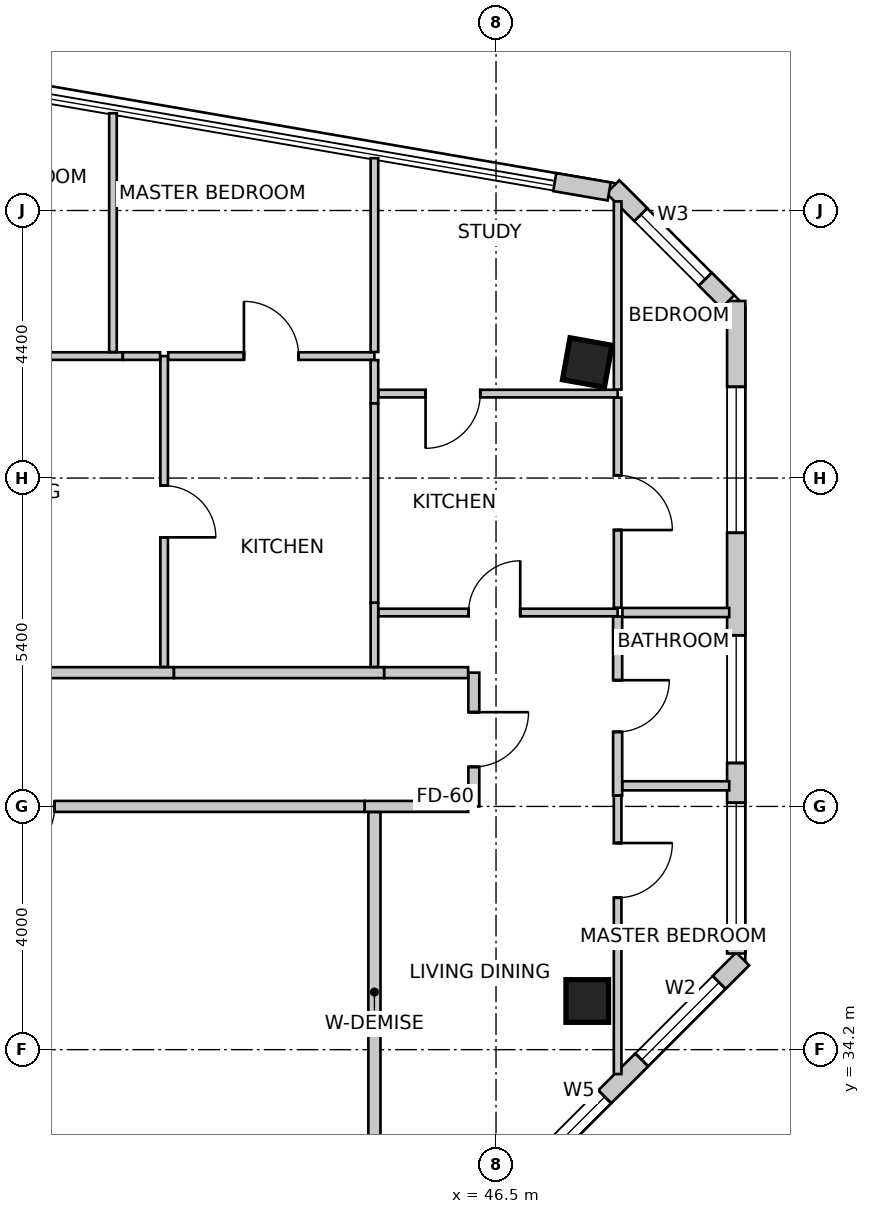
"""IFC4 building model, lengths in metres.
Left out: names, types, materials, properties, quantities, classifications, styles, units other than length and angle.
Written with IfcOpenShell. Run it as: python <this file> out.ifc"""

import sys

from ifc_helpers import new_model, si_unit, direction, frame, frame_2d, origin, origin_2d, place, context, subcontext, project, spatial, rectangle, extrude, source, transform, mapped, element, fill, save


model = new_model("IFC4")
c1 = context("Model", 3, precision=1e-05, world=origin(), true_north=direction((0.0, 1.0)))
c2 = subcontext(c1, "Body", "Model", "MODEL_VIEW")
j1 = project(units=[si_unit("LENGTHUNIT", "METRE"), si_unit("PLANEANGLEUNIT", "RADIAN")], contexts=[c1])
p1 = place(None, origin())
s1 = spatial("IfcSite", under=j1, at=p1, CompositionType="ELEMENT")
p2 = place(p1, origin())
s2 = spatial("IfcBuilding", under=s1, at=p2, CompositionType="ELEMENT")
p3 = place(p2, frame((0.0, 0.0, 200.9)))
s3 = spatial("IfcBuildingStorey", under=s2, at=p3, CompositionType="ELEMENT", Elevation=200.9)
m1 = source(origin(), c2, "Body", "SweptSolid", [
    extrude(rectangle(XDim=0.7, YDim=0.7, at=origin_2d()), origin(), (0.0, 0.0, 1.0), 3.5),
])
for number, where, z_axis, x_axis in (
    (1, (48.0, 45.5, 0.0), (0.0, 0.0, 1.0), (0.984, -0.177, 0.0)),
    (2, (48.0, 35.0, 0.0), (0.0, 0.0, 1.0), (1.0, 0.0, 0.0)),
):
    element("IfcColumn", number, at=place(p3, frame(where, z_axis=z_axis, x_axis=x_axis)), inside=s3, PredefinedType="COLUMN", context=c2, shape_type="MappedRepresentation", body=[
        mapped(m1, transform((0.0, 0.0, 0.0), scale=1.0)),
    ])
p4 = place(p3, frame((47.076, 32.212, 0.0), z_axis=(0.0, 0.0, 1.0), x_axis=(0.707106781187, 0.707106781187, 0.0)))
e3 = element("IfcWall", 3, at=p4, inside=s3, PredefinedType="SOLIDWALL", context=c2, shape_type="SweptSolid", body=[
    extrude(rectangle(XDim=4.922, YDim=0.3, at=frame_2d((2.461, 0.0))), origin(), (0.0, 0.0, 1.0), 3.25),
])
m2 = source(origin(), c2, "Body", "SweptSolid", [
    extrude(rectangle(XDim=1.2, YDim=1.6, at=frame_2d((0.6, 0.8))), frame((0.0, 0.16, 0.0), z_axis=(0.0, -1.0, 0.0), x_axis=(1.0, 0.0, 0.0)), (0.0, 0.0, 1.0), 0.32),
])
p5 = place(p4, frame((0.515, 0.0, 0.85)))
e4 = element("IfcOpeningElement", 4, at=p5, cuts=e3, PredefinedType="OPENING", context=c2, shape_type="MappedRepresentation", body=[
    mapped(m2, transform((0.0, 0.0, 0.0), scale=1.0)),
])
m3 = source(origin(), c2, "Body", "SweptSolid", [
    extrude(rectangle(XDim=1.8, YDim=2.1, at=frame_2d((0.9, 1.05))), frame((0.0, 0.16, 0.0), z_axis=(0.0, -1.0, 0.0), x_axis=(1.0, 0.0, 0.0)), (0.0, 0.0, 1.0), 0.32),
])
p6 = place(p4, frame((2.575, 0.0, 0.85)))
e5 = element("IfcOpeningElement", 5, at=p6, cuts=e3, PredefinedType="OPENING", context=c2, shape_type="MappedRepresentation", body=[
    mapped(m3, transform((0.0, 0.0, 0.0), scale=1.0)),
])
p7 = place(p3, frame((50.45, 35.781, 0.0), z_axis=(0.0, 0.0, 1.0), x_axis=(0.0, 1.0, 0.0)))
e6 = element("IfcWall", 6, at=p7, inside=s3, PredefinedType="SOLIDWALL", context=c2, shape_type="SweptSolid", body=[
    extrude(rectangle(XDim=10.731, YDim=0.3, at=frame_2d((5.365, 0.0))), origin(), (0.0, 0.0, 1.0), 3.25),
])
m4 = source(origin(), c2, "Body", "SweptSolid", [
    extrude(rectangle(XDim=2.1, YDim=2.0, at=frame_2d((1.05, 1.0))), frame((0.0, 0.16, 0.0), z_axis=(0.0, -1.0, 0.0), x_axis=(1.0, 0.0, 0.0)), (0.0, 0.0, 1.0), 0.32),
])
p8 = place(p7, frame((0.379, 0.0, 0.85)))
e7 = element("IfcOpeningElement", 7, at=p8, cuts=e6, PredefinedType="OPENING", context=c2, shape_type="MappedRepresentation", body=[
    mapped(m4, transform((0.0, 0.0, 0.0), scale=1.0)),
])
p9 = place(p7, frame((3.133, 0.0, 0.85)))
e8 = element("IfcOpeningElement", 8, at=p9, cuts=e6, PredefinedType="OPENING", context=c2, shape_type="MappedRepresentation", body=[
    mapped(m4, transform((0.0, 0.0, 0.0), scale=1.0)),
])
m5 = source(origin(), c2, "Body", "SweptSolid", [
    extrude(rectangle(XDim=2.4, YDim=2.2, at=frame_2d((1.2, 1.1))), frame((0.0, 0.16, 0.0), z_axis=(0.0, -1.0, 0.0), x_axis=(1.0, 0.0, 0.0)), (0.0, 0.0, 1.0), 0.32),
])
p10 = place(p7, frame((6.919, 0.0, 0.85)))
e9 = element("IfcOpeningElement", 9, at=p10, cuts=e6, PredefinedType="OPENING", context=c2, shape_type="MappedRepresentation", body=[
    mapped(m5, transform((0.0, 0.0, 0.0), scale=1.0)),
])
p11 = place(p3, frame((50.312, 46.5, 0.0), z_axis=(0.0, 0.0, 1.0), x_axis=(-0.707106781187, 0.707106781187, 0.0)))
e10 = element("IfcWall", 10, at=p11, inside=s3, PredefinedType="SOLIDWALL", context=c2, shape_type="SweptSolid", body=[
    extrude(rectangle(XDim=2.673, YDim=0.3, at=frame_2d((1.337, 0.0))), origin(), (0.0, 0.0, 1.0), 3.25),
])
m6 = source(origin(), c2, "Body", "SweptSolid", [
    extrude(rectangle(XDim=1.5, YDim=1.8, at=frame_2d((0.75, 0.9))), frame((0.0, 0.16, 0.0), z_axis=(0.0, -1.0, 0.0), x_axis=(1.0, 0.0, 0.0)), (0.0, 0.0, 1.0), 0.32),
])
p12 = place(p11, frame((0.524, 0.0, 0.85)))
e11 = element("IfcOpeningElement", 11, at=p12, cuts=e10, PredefinedType="OPENING", context=c2, shape_type="MappedRepresentation", body=[
    mapped(m6, transform((0.0, 0.0, 0.0), scale=1.0)),
])
p13 = place(p3, frame((48.361, 48.313, 0.0), z_axis=(0.0, 0.0, 1.0), x_axis=(-0.985560806516, 0.169321872949, 0.0)))
e12 = element("IfcWall", 12, at=p13, inside=s3, PredefinedType="SOLIDWALL", context=c2, shape_type="SweptSolid", body=[
    extrude(rectangle(XDim=0.908, YDim=0.3, at=frame_2d((0.454, 0.0))), origin(), (0.0, 0.0, 1.0), 3.25),
])
p14 = place(p3, frame((33.244, 40.4, 0.0), z_axis=(0.0, 0.0, 1.0), x_axis=(1.0, 0.0, 0.0)))
e13 = element("IfcWall", 13, at=p14, inside=s3, PredefinedType="PARTITIONING", context=c2, shape_type="SweptSolid", body=[
    extrude(rectangle(XDim=7.958, YDim=0.18, at=frame_2d((3.979, 0.0))), origin(), (0.0, 0.0, 1.0), 2.766),
])
m7 = source(origin(), c2, "Body", "SweptSolid", [
    extrude(rectangle(XDim=0.9, YDim=2.15, at=frame_2d((0.45, 1.075))), frame((0.0, 0.1, 0.0), z_axis=(0.0, -1.0, 0.0), x_axis=(1.0, 0.0, 0.0)), (0.0, 0.0, 1.0), 0.2),
])
p15 = place(p14, frame((2.807, 0.0, 0.0)))
e14 = element("IfcOpeningElement", 14, at=p15, cuts=e13, PredefinedType="OPENING", context=c2, shape_type="MappedRepresentation", body=[
    mapped(m7, transform((0.0, 0.0, 0.0), scale=1.0)),
])
p16 = place(p3, frame((41.204, 40.4, 0.0), z_axis=(0.0, 0.0, 1.0), x_axis=(1.0, 0.0, 0.0)))
e15 = element("IfcWall", 15, at=p16, inside=s3, PredefinedType="PARTITIONING", context=c2, shape_type="SweptSolid", body=[
    extrude(rectangle(XDim=3.456, YDim=0.18, at=frame_2d((1.728, 0.0))), origin(), (0.0, 0.0, 1.0), 2.822),
])
p17 = place(p3, frame((46.135, 40.4, 0.0), z_axis=(0.0, 0.0, 1.0), x_axis=(0.0, -1.0, 0.0)))
e16 = element("IfcWall", 16, at=p17, inside=s3, PredefinedType="PARTITIONING", context=c2, shape_type="SweptSolid", body=[
    extrude(rectangle(XDim=2.2, YDim=0.18, at=frame_2d((1.1, 0.0))), origin(), (0.0, 0.0, 1.0), 3.25),
])
p18 = place(p17, frame((0.65, 0.0, 0.0)))
e17 = element("IfcOpeningElement", 17, at=p18, cuts=e16, PredefinedType="OPENING", context=c2, shape_type="MappedRepresentation", body=[
    mapped(m7, transform((0.0, 0.0, 0.0), scale=1.0)),
])
p19 = place(p3, frame((44.662, 40.4, 0.0), z_axis=(0.0, 0.0, 1.0), x_axis=(1.0, 0.0, 0.0)))
e18 = element("IfcWall", 18, at=p19, inside=s3, PredefinedType="PARTITIONING", context=c2, shape_type="SweptSolid", body=[
    extrude(rectangle(XDim=1.379, YDim=0.18, at=frame_2d((0.689, 0.0))), origin(), (0.0, 0.0, 1.0), 3.25),
])
p20 = place(p3, frame((46.041, 38.2, 0.0), z_axis=(0.0, 0.0, 1.0), x_axis=(-1.0, 0.0, 0.0)))
e19 = element("IfcWall", 19, at=p20, inside=s3, PredefinedType="PARTITIONING", context=c2, shape_type="SweptSolid", body=[
    extrude(rectangle(XDim=1.701, YDim=0.18, at=frame_2d((0.851, 0.0))), origin(), (0.0, 0.0, 1.0), 2.934),
])
p21 = place(p3, frame((44.338, 38.2, 0.0), z_axis=(0.0, 0.0, 1.0), x_axis=(-1.0, 0.0, 0.0)))
e20 = element("IfcWall", 20, at=p21, inside=s3, PredefinedType="PARTITIONING", context=c2, shape_type="SweptSolid", body=[
    extrude(rectangle(XDim=11.094, YDim=0.18, at=frame_2d((5.547, 0.0))), origin(), (0.0, 0.0, 1.0), 2.766),
])
p22 = place(p21, frame((5.097, 0.0, 0.0)))
e21 = element("IfcOpeningElement", 21, at=p22, cuts=e20, PredefinedType="OPENING", context=c2, shape_type="MappedRepresentation", body=[
    mapped(m7, transform((0.0, 0.0, 0.0), scale=1.0)),
])
p23 = place(p3, frame((41.042, 45.606, 0.0), z_axis=(0.0, 0.0, 1.0), x_axis=(0.0, -1.0, 0.0)))
e22 = element("IfcWall", 22, at=p23, inside=s3, PredefinedType="PARTITIONING", context=c2, shape_type="SweptSolid", body=[
    extrude(rectangle(XDim=5.112, YDim=0.125, at=frame_2d((2.556, 0.0))), origin(), (0.0, 0.0, 1.0), 2.822),
])
m8 = source(origin(), c2, "Body", "SweptSolid", [
    extrude(rectangle(XDim=0.85, YDim=2.15, at=frame_2d((0.425, 1.075))), frame((0.0, 0.073, 0.0), z_axis=(0.0, -1.0, 0.0), x_axis=(1.0, 0.0, 0.0)), (0.0, 0.0, 1.0), 0.145),
])
p24 = place(p23, frame((2.131, 0.0, 0.0)))
e23 = element("IfcOpeningElement", 23, at=p24, cuts=e22, PredefinedType="OPENING", context=c2, shape_type="MappedRepresentation", body=[
    mapped(m8, transform((0.0, 0.0, 0.0), scale=1.0)),
])
p25 = place(p3, frame((36.062, 45.606, 0.0), z_axis=(0.0, 0.0, 1.0), x_axis=(1.0, 0.0, 0.0)))
e24 = element("IfcWall", 24, at=p25, inside=s3, PredefinedType="PARTITIONING", context=c2, shape_type="SweptSolid", body=[
    extrude(rectangle(XDim=4.298, YDim=0.125, at=frame_2d((2.149, 0.0))), origin(), (0.0, 0.0, 1.0), 2.766),
])
m9 = source(origin(), c2, "Body", "SweptSolid", [
    extrude(rectangle(XDim=0.9, YDim=2.15, at=frame_2d((0.45, 1.075))), frame((0.0, 0.073, 0.0), z_axis=(0.0, -1.0, 0.0), x_axis=(1.0, 0.0, 0.0)), (0.0, 0.0, 1.0), 0.145),
])
p26 = place(p25, frame((0.403, 0.0, 0.0)))
e25 = element("IfcOpeningElement", 25, at=p26, cuts=e24, PredefinedType="OPENING", context=c2, shape_type="MappedRepresentation", body=[
    mapped(m9, transform((0.0, 0.0, 0.0), scale=1.0)),
])
p27 = place(p3, frame((40.362, 45.606, 0.0), z_axis=(0.0, 0.0, 1.0), x_axis=(1.0, 0.0, 0.0)))
e26 = element("IfcWall", 26, at=p27, inside=s3, PredefinedType="PARTITIONING", context=c2, shape_type="SweptSolid", body=[
    extrude(rectangle(XDim=0.614, YDim=0.125, at=frame_2d((0.307, 0.0))), origin(), (0.0, 0.0, 1.0), 3.25),
])
p28 = place(p3, frame((41.108, 45.606, 0.0), z_axis=(0.0, 0.0, 1.0), x_axis=(1.0, 0.0, 0.0)))
e27 = element("IfcWall", 27, at=p28, inside=s3, PredefinedType="PARTITIONING", context=c2, shape_type="SweptSolid", body=[
    extrude(rectangle(XDim=3.392, YDim=0.125, at=frame_2d((1.696, 0.0))), origin(), (0.0, 0.0, 1.0), 3.25),
])
p29 = place(p28, frame((1.246, 0.0, 0.0)))
e28 = element("IfcOpeningElement", 28, at=p29, cuts=e27, PredefinedType="OPENING", context=c2, shape_type="MappedRepresentation", body=[
    mapped(m9, transform((0.0, 0.0, 0.0), scale=1.0)),
])
p30 = place(p3, frame((44.5, 45.54, 0.0), z_axis=(0.0, 0.0, 1.0), x_axis=(0.0, -1.0, 0.0)))
e29 = element("IfcWall", 29, at=p30, inside=s3, PredefinedType="PARTITIONING", context=c2, shape_type="SweptSolid", body=[
    extrude(rectangle(XDim=0.71, YDim=0.125, at=frame_2d((0.355, 0.0))), origin(), (0.0, 0.0, 1.0), 3.25),
])
p31 = place(p3, frame((44.5, 41.549, 0.0), z_axis=(0.0, 0.0, 1.0), x_axis=(0.0, -1.0, 0.0)))
e30 = element("IfcWall", 30, at=p31, inside=s3, PredefinedType="PARTITIONING", context=c2, shape_type="SweptSolid", body=[
    extrude(rectangle(XDim=1.055, YDim=0.125, at=frame_2d((0.528, 0.0))), origin(), (0.0, 0.0, 1.0), 2.822),
])
p32 = place(p3, frame((44.5, 44.827, 0.0), z_axis=(0.0, 0.0, 1.0), x_axis=(0.0, -1.0, 0.0)))
e31 = element("IfcWall", 31, at=p32, inside=s3, PredefinedType="PARTITIONING", context=c2, shape_type="SweptSolid", body=[
    extrude(rectangle(XDim=3.276, YDim=0.125, at=frame_2d((1.638, 0.0))), origin(), (0.0, 0.0, 1.0), 2.822),
])
p33 = place(p3, frame((40.2, 49.6, 0.0), z_axis=(0.0, 0.0, 1.0), x_axis=(0.0, -1.0, 0.0)))
e32 = element("IfcWall", 32, at=p33, inside=s3, PredefinedType="PARTITIONING", context=c2, shape_type="SweptSolid", body=[
    extrude(rectangle(XDim=3.927, YDim=0.125, at=frame_2d((1.964, 0.0))), origin(), (0.0, 0.0, 1.0), 2.542),
])
p34 = place(p3, frame((44.5, 48.86, 0.0), z_axis=(0.0, 0.0, 1.0), x_axis=(0.0, -1.0, 0.0)))
e33 = element("IfcWall", 33, at=p34, inside=s3, PredefinedType="PARTITIONING", context=c2, shape_type="SweptSolid", body=[
    extrude(rectangle(XDim=3.188, YDim=0.125, at=frame_2d((1.594, 0.0))), origin(), (0.0, 0.0, 1.0), 2.542),
])
p35 = place(p3, frame((48.5, 44.989, 0.0), z_axis=(0.0, 0.0, 1.0), x_axis=(-1.0, 0.0, 0.0)))
e34 = element("IfcWall", 34, at=p35, inside=s3, PredefinedType="PARTITIONING", context=c2, shape_type="SweptSolid", body=[
    extrude(rectangle(XDim=3.934, YDim=0.125, at=frame_2d((1.967, 0.0))), origin(), (0.0, 0.0, 1.0), 2.766),
])
p36 = place(p35, frame((2.259, 0.0, 0.0)))
e35 = element("IfcOpeningElement", 35, at=p36, cuts=e34, PredefinedType="OPENING", context=c2, shape_type="MappedRepresentation", body=[
    mapped(m9, transform((0.0, 0.0, 0.0), scale=1.0)),
])
p37 = place(p3, frame((48.5, 48.149, 0.0), z_axis=(0.0, 0.0, 1.0), x_axis=(0.0, -1.0, 0.0)))
e36 = element("IfcWall", 36, at=p37, inside=s3, PredefinedType="PARTITIONING", context=c2, shape_type="SweptSolid", body=[
    extrude(rectangle(XDim=3.094, YDim=0.125, at=frame_2d((1.547, 0.0))), origin(), (0.0, 0.0, 1.0), 3.25),
])
p38 = place(p3, frame((44.566, 41.389, 0.0), z_axis=(0.0, 0.0, 1.0), x_axis=(1.0, 0.0, 0.0)))
e37 = element("IfcWall", 37, at=p38, inside=s3, PredefinedType="PARTITIONING", context=c2, shape_type="SweptSolid", body=[
    extrude(rectangle(XDim=3.934, YDim=0.125, at=frame_2d((1.967, 0.0))), origin(), (0.0, 0.0, 1.0), 2.766),
])
p39 = place(p38, frame((1.482, 0.0, 0.0)))
e38 = element("IfcOpeningElement", 38, at=p39, cuts=e37, PredefinedType="OPENING", context=c2, shape_type="MappedRepresentation", body=[
    mapped(m8, transform((0.0, 0.0, 0.0), scale=1.0)),
])
p40 = place(p3, frame((48.5, 41.323, 0.0), z_axis=(0.0, 0.0, 1.0), x_axis=(0.0, -1.0, 0.0)))
e39 = element("IfcWall", 39, at=p40, inside=s3, PredefinedType="PARTITIONING", context=c2, shape_type="SweptSolid", body=[
    extrude(rectangle(XDim=2.944, YDim=0.15, at=frame_2d((1.472, 0.0))), origin(), (0.0, 0.0, 1.0), 3.25),
])
m10 = source(origin(), c2, "Body", "SweptSolid", [
    extrude(rectangle(XDim=0.85, YDim=2.15, at=frame_2d((0.425, 1.075))), frame((0.0, 0.085, 0.0), z_axis=(0.0, -1.0, 0.0), x_axis=(1.0, 0.0, 0.0)), (0.0, 0.0, 1.0), 0.17),
])
p41 = place(p40, frame((1.047, 0.0, 0.0)))
e40 = element("IfcOpeningElement", 40, at=p41, cuts=e39, PredefinedType="OPENING", context=c2, shape_type="MappedRepresentation", body=[
    mapped(m10, transform((0.0, 0.0, 0.0), scale=1.0)),
])
p42 = place(p3, frame((48.5, 38.377, 0.0), z_axis=(0.0, 0.0, 1.0), x_axis=(0.0, -1.0, 0.0)))
e41 = element("IfcWall", 41, at=p42, inside=s3, PredefinedType="PARTITIONING", context=c2, shape_type="SweptSolid", body=[
    extrude(rectangle(XDim=4.578, YDim=0.125, at=frame_2d((2.289, 0.0))), origin(), (0.0, 0.0, 1.0), 3.25),
])
p43 = place(p42, frame((0.779, 0.0, 0.0)))
e42 = element("IfcOpeningElement", 42, at=p43, cuts=e41, PredefinedType="OPENING", context=c2, shape_type="MappedRepresentation", body=[
    mapped(m9, transform((0.0, 0.0, 0.0), scale=1.0)),
])
p44 = place(p3, frame((44.5, 32.189, 0.0), z_axis=(0.0, 0.0, 1.0), x_axis=(0.0, 1.0, 0.0)))
e43 = element("IfcWall", 43, at=p44, inside=s3, PredefinedType="PARTITIONING", context=c2, shape_type="SweptSolid", body=[
    extrude(rectangle(XDim=5.917, YDim=0.2, at=frame_2d((2.958, 0.0))), origin(), (0.0, 0.0, 1.0), 2.542),
])
p45 = place(p3, frame((48.5, 44.923, 0.0), z_axis=(0.0, 0.0, 1.0), x_axis=(0.0, -1.0, 0.0)))
e44 = element("IfcWall", 44, at=p45, inside=s3, PredefinedType="PARTITIONING", context=c2, shape_type="SweptSolid", body=[
    extrude(rectangle(XDim=3.455, YDim=0.125, at=frame_2d((1.727, 0.0))), origin(), (0.0, 0.0, 1.0), 3.25),
])
p46 = place(p45, frame((1.277, 0.0, 0.0)))
e45 = element("IfcOpeningElement", 45, at=p46, cuts=e44, PredefinedType="OPENING", context=c2, shape_type="MappedRepresentation", body=[
    mapped(m9, transform((0.0, 0.0, 0.0), scale=1.0)),
])
for number, where, z_axis, x_axis in (
    (46, (48.579, 41.389, 0.0), (0.0, 0.0, 1.0), (1.0, 0.0, 0.0)),
    (47, (50.335, 38.539, 0.0), (0.0, 0.0, 1.0), (-1.0, 0.0, 0.0)),
):
    element("IfcWall", number, at=place(p3, frame(where, z_axis=z_axis, x_axis=x_axis)), inside=s3, PredefinedType="PARTITIONING", context=c2, shape_type="SweptSolid", body=[
        extrude(rectangle(XDim=1.756, YDim=0.15, at=frame_2d((0.878, 0.0))), origin(), (0.0, 0.0, 1.0), 3.25),
    ])
m11 = source(origin(), c2, "Body", "SweptSolid", [
    extrude(rectangle(XDim=1.2, YDim=1.6, at=frame_2d((0.6, 0.8))), frame((0.0, -0.015, 0.0), z_axis=(0.0, -1.0, 0.0), x_axis=(1.0, 0.0, 0.0)), (0.0, 0.0, 1.0), 0.06),
])
p47 = place(p5, origin())
e48 = element("IfcWindow", 48, at=p47, inside=s3, PartitioningType="SINGLE_PANEL", PredefinedType="WINDOW", context=c2, shape_type="MappedRepresentation", body=[
    mapped(m11, transform((0.0, 0.0, 0.0), scale=1.0)),
])
fill(e4, e48)
m12 = source(origin(), c2, "Body", "SweptSolid", [
    extrude(rectangle(XDim=1.8, YDim=2.1, at=frame_2d((0.9, 1.05))), frame((0.0, -0.015, 0.0), z_axis=(0.0, -1.0, 0.0), x_axis=(1.0, 0.0, 0.0)), (0.0, 0.0, 1.0), 0.06),
])
p48 = place(p6, origin())
e49 = element("IfcWindow", 49, at=p48, inside=s3, PartitioningType="SINGLE_PANEL", PredefinedType="WINDOW", context=c2, shape_type="MappedRepresentation", body=[
    mapped(m12, transform((0.0, 0.0, 0.0), scale=1.0)),
])
fill(e5, e49)
m13 = source(origin(), c2, "Body", "SweptSolid", [
    extrude(rectangle(XDim=2.1, YDim=2.0, at=frame_2d((1.05, 1.0))), frame((0.0, -0.015, 0.0), z_axis=(0.0, -1.0, 0.0), x_axis=(1.0, 0.0, 0.0)), (0.0, 0.0, 1.0), 0.06),
])
p49 = place(p8, origin())
e50 = element("IfcWindow", 50, at=p49, inside=s3, PartitioningType="SINGLE_PANEL", PredefinedType="WINDOW", context=c2, shape_type="MappedRepresentation", body=[
    mapped(m13, transform((0.0, 0.0, 0.0), scale=1.0)),
])
fill(e7, e50)
p50 = place(p9, origin())
e51 = element("IfcWindow", 51, at=p50, inside=s3, PartitioningType="SINGLE_PANEL", PredefinedType="WINDOW", context=c2, shape_type="MappedRepresentation", body=[
    mapped(m13, transform((0.0, 0.0, 0.0), scale=1.0)),
])
fill(e8, e51)
m14 = source(origin(), c2, "Body", "SweptSolid", [
    extrude(rectangle(XDim=2.4, YDim=2.2, at=frame_2d((1.2, 1.1))), frame((0.0, -0.015, 0.0), z_axis=(0.0, -1.0, 0.0), x_axis=(1.0, 0.0, 0.0)), (0.0, 0.0, 1.0), 0.06),
])
p51 = place(p10, origin())
e52 = element("IfcWindow", 52, at=p51, inside=s3, PartitioningType="SINGLE_PANEL", PredefinedType="WINDOW", context=c2, shape_type="MappedRepresentation", body=[
    mapped(m14, transform((0.0, 0.0, 0.0), scale=1.0)),
])
fill(e9, e52)
m15 = source(origin(), c2, "Body", "SweptSolid", [
    extrude(rectangle(XDim=1.5, YDim=1.8, at=frame_2d((0.75, 0.9))), frame((0.0, -0.015, 0.0), z_axis=(0.0, -1.0, 0.0), x_axis=(1.0, 0.0, 0.0)), (0.0, 0.0, 1.0), 0.06),
])
p52 = place(p12, origin())
e53 = element("IfcWindow", 53, at=p52, inside=s3, PartitioningType="SINGLE_PANEL", PredefinedType="WINDOW", context=c2, shape_type="MappedRepresentation", body=[
    mapped(m15, transform((0.0, 0.0, 0.0), scale=1.0)),
])
fill(e11, e53)
m16 = source(origin(), c2, "Body", "SweptSolid", [
    extrude(rectangle(XDim=0.85, YDim=2.15, at=frame_2d((0.425, 1.075))), frame((0.0, 0.025, 0.0), z_axis=(0.0, -1.0, 0.0), x_axis=(1.0, 0.0, 0.0)), (0.0, 0.0, 1.0), 0.05),
])
p53 = place(p24, origin())
e54 = element("IfcDoor", 54, at=p53, inside=s3, OperationType="SINGLE_SWING_RIGHT", PredefinedType="DOOR", context=c2, shape_type="MappedRepresentation", body=[
    mapped(m16, transform((0.0, 0.0, 0.0), scale=1.0)),
])
fill(e23, e54)
m17 = source(origin(), c2, "Body", "SweptSolid", [
    extrude(rectangle(XDim=0.9, YDim=2.15, at=frame_2d((0.45, 1.075))), frame((0.0, 0.025, 0.0), z_axis=(0.0, -1.0, 0.0), x_axis=(1.0, 0.0, 0.0)), (0.0, 0.0, 1.0), 0.05),
])
p54 = place(p29, origin())
e55 = element("IfcDoor", 55, at=p54, inside=s3, OperationType="SINGLE_SWING_LEFT", PredefinedType="DOOR", context=c2, shape_type="MappedRepresentation", body=[
    mapped(m17, transform((0.0, 0.0, 0.0), scale=1.0)),
])
fill(e28, e55)
p55 = place(p36, origin())
e56 = element("IfcDoor", 56, at=p55, inside=s3, OperationType="SINGLE_SWING_RIGHT", PredefinedType="DOOR", context=c2, shape_type="MappedRepresentation", body=[
    mapped(m17, transform((0.0, 0.0, 0.0), scale=1.0)),
])
fill(e35, e56)
m18 = source(origin(), c2, "Body", "SweptSolid", [
    extrude(rectangle(XDim=0.9, YDim=2.15, at=frame_2d((0.45, 1.075))), frame((0.0, 0.025, 0.0), z_axis=(0.0, -1.0, 0.0), x_axis=(1.0, 0.0, 0.0)), (0.0, 0.0, 1.0), 0.05),
])
p56 = place(p18, origin())
e57 = element("IfcDoor", 57, at=p56, inside=s3, OperationType="SINGLE_SWING_LEFT", PredefinedType="DOOR", context=c2, shape_type="MappedRepresentation", body=[
    mapped(m18, transform((0.0, 0.0, 0.0), scale=1.0)),
])
fill(e17, e57)
p57 = place(p39, origin())
e58 = element("IfcDoor", 58, at=p57, inside=s3, OperationType="SINGLE_SWING_RIGHT", PredefinedType="DOOR", context=c2, shape_type="MappedRepresentation", body=[
    mapped(m16, transform((0.0, 0.0, 0.0), scale=1.0)),
])
fill(e38, e58)
p58 = place(p41, origin())
e59 = element("IfcDoor", 59, at=p58, inside=s3, OperationType="SINGLE_SWING_LEFT", PredefinedType="DOOR", context=c2, shape_type="MappedRepresentation", body=[
    mapped(m16, transform((0.0, 0.0, 0.0), scale=1.0)),
])
fill(e40, e59)
p59 = place(p46, origin())
e60 = element("IfcDoor", 60, at=p59, inside=s3, OperationType="SINGLE_SWING_RIGHT", PredefinedType="DOOR", context=c2, shape_type="MappedRepresentation", body=[
    mapped(m17, transform((0.0, 0.0, 0.0), scale=1.0)),
])
fill(e45, e60)
p60 = place(p43, origin())
e61 = element("IfcDoor", 61, at=p60, inside=s3, OperationType="SINGLE_SWING_LEFT", PredefinedType="DOOR", context=c2, shape_type="MappedRepresentation", body=[
    mapped(m17, transform((0.0, 0.0, 0.0), scale=1.0)),
])
fill(e42, e61)
p61 = place(p22, origin())
e62 = element("IfcDoor", 62, at=p61, inside=s3, OperationType="SINGLE_SWING_RIGHT", PredefinedType="DOOR", context=c2, shape_type="MappedRepresentation", body=[
    mapped(m17, transform((0.0, 0.0, 0.0), scale=1.0)),
])
fill(e21, e62)
save(model, sys.argv[1])
